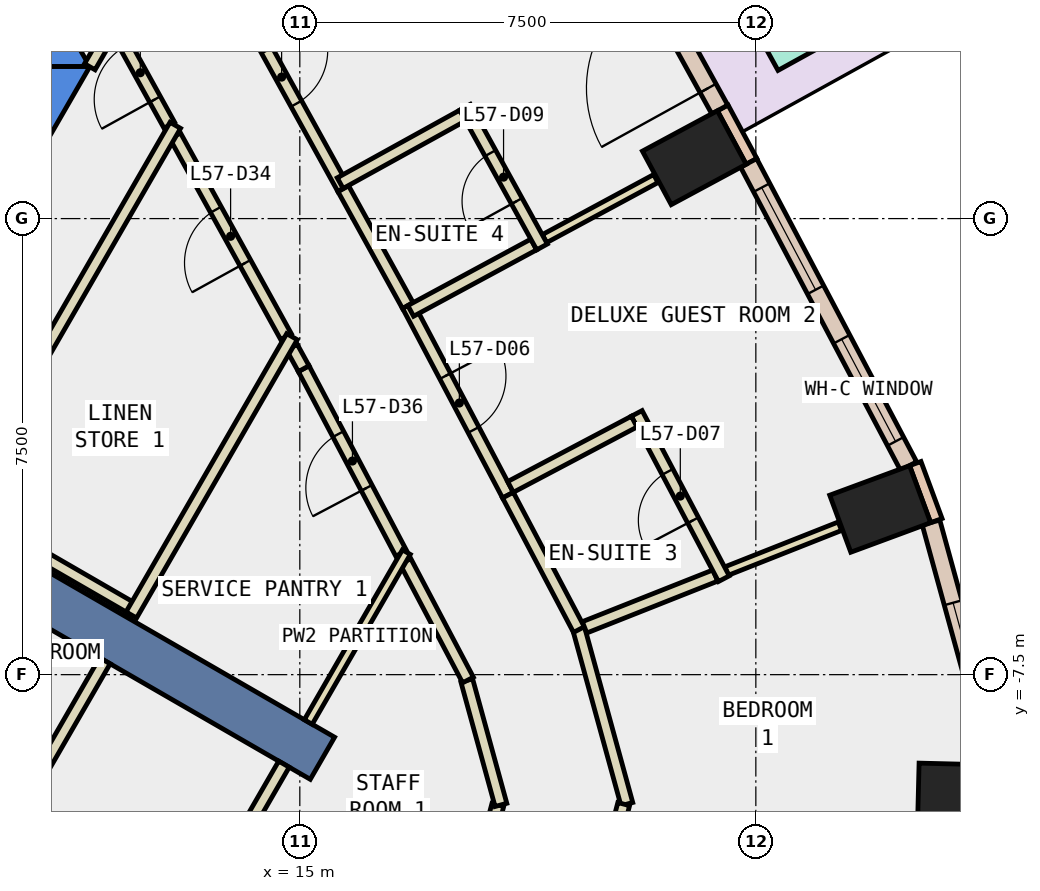
"""IFC4 building model, lengths in metres.
Left out: names, types, materials, properties, quantities, classifications, styles, units other than length and angle.
Written with IfcOpenShell. Run it as: python <this file> out.ifc"""

import sys

from ifc_helpers import new_model, si_unit, direction, frame, frame_2d, origin, origin_2d, place, context, subcontext, project, spatial, polyline, rectangle, outline, extrude, element, fill, save


model = new_model("IFC4")
c1 = context("Model", 3, precision=1e-05, world=origin(), true_north=direction((0.0, 1.0)))
c2 = subcontext(c1, "Body", "Model", "MODEL_VIEW")
j1 = project(units=[si_unit("LENGTHUNIT", "METRE"), si_unit("PLANEANGLEUNIT", "RADIAN")], contexts=[c1])
p1 = place(None, origin())
s1 = spatial("IfcSite", under=j1, at=p1, CompositionType="ELEMENT")
p2 = place(p1, origin())
s2 = spatial("IfcBuilding", under=s1, at=p2, CompositionType="ELEMENT")
p3 = place(p2, frame((0.0, 0.0, 252.2)))
s3 = spatial("IfcBuildingStorey", under=s2, at=p3, CompositionType="ELEMENT", Elevation=252.2)
for number, where, z_axis, x_axis in (
    (1, (25.872, -9.472, -0.34), (0.0, 0.0, 1.0), (0.025, 1.0, 0.0)),
    (2, (24.545, -4.775, -0.34), (0.0, 0.0, 1.0), (-0.347, 0.938, 0.0)),
    (3, (21.488, 1.001, -0.34), (0.0, 0.0, 1.0), (-0.474, 0.881, 0.0)),
):
    element("IfcColumn", number, at=place(p3, frame(where, z_axis=z_axis, x_axis=x_axis)), inside=s3, PredefinedType="COLUMN", context=c2, shape_type="SweptSolid", body=[
        extrude(rectangle(XDim=1.0, YDim=1.4, at=origin_2d()), origin(), (0.0, 0.0, 1.0), 3.6),
    ])
p4 = place(p3, frame((0.0, 0.0, -0.34)))
e4 = element("IfcWall", 4, at=p4, inside=s3, PredefinedType="SHEAR", context=c2, shape_type="SweptSolid", body=[
    extrude(outline(polyline([(6.786, 10.747), (6.266, 10.447), (10.854, 2.5), (11.547, 2.5), (6.786, 10.747)])), origin(), (0.0, 0.0, 1.0), 3.6),
])
p5 = place(p3, frame((0.0, 0.0, -0.34)))
e5 = element("IfcWall", 5, at=p5, inside=s3, PredefinedType="SHEAR", context=c2, shape_type="SweptSolid", body=[
    extrude(outline(polyline([(5.774, -7.5), (11.547, 2.5), (10.854, 2.5), (5.427, -6.9), (5.774, -7.5)])), origin(), (0.0, 0.0, 1.0), 3.6),
])
p6 = place(p3, frame((7.578, -4.375, -0.34), z_axis=(0.0, 0.0, 1.0), x_axis=(0.866024315419, -0.5000018851, 0.0)))
e6 = element("IfcWall", 6, at=p6, inside=s3, PredefinedType="SHEAR", context=c2, shape_type="SweptSolid", body=[
    extrude(rectangle(XDim=9.0, YDim=0.8, at=frame_2d((4.5, 0.0))), origin(), (0.0, 0.0, 1.0), 3.6),
])
p7 = place(p3, frame((25.469, -4.967, 0.0), z_axis=(0.0, 0.0, 1.0), x_axis=(-0.346892928577, 0.937904737222, 0.0)))
e7 = element("IfcWall", 7, at=p7, inside=s3, PredefinedType="STANDARD", context=c2, shape_type="SweptSolid", body=[
    extrude(rectangle(XDim=1.0, YDim=0.2, at=frame_2d((0.5, 0.0))), origin(), (0.0, 0.0, 1.0), 3.26),
])
p8 = place(p3, frame((22.429, 0.94, 0.0), z_axis=(0.0, 0.0, 1.0), x_axis=(-0.473663196434, 0.88070606694, 0.0)))
e8 = element("IfcWall", 8, at=p8, inside=s3, PredefinedType="STANDARD", context=c2, shape_type="SweptSolid", body=[
    extrude(rectangle(XDim=1.0, YDim=0.2, at=frame_2d((0.5, 0.0))), origin(), (0.0, 0.0, 1.0), 3.26),
])
p9 = place(p3, frame((26.477, -8.987, 0.0), z_axis=(0.0, 0.0, 1.0), x_axis=(-0.264924661919, 0.964269113633, 0.0)))
e9 = element("IfcWall", 9, at=p9, inside=s3, PredefinedType="STANDARD", context=c2, shape_type="SweptSolid", body=[
    extrude(rectangle(XDim=4.137, YDim=0.3, at=frame_2d((2.068, 0.0))), origin(), (0.0, 0.0, 1.0), 3.26),
])
p10 = place(p9, frame((1.368, 0.0, 0.9)))
e10 = element("IfcOpeningElement", 10, at=p10, cuts=e9, PredefinedType="OPENING", context=c2, shape_type="SweptSolid", body=[
    extrude(rectangle(XDim=1.4, YDim=2.0, at=frame_2d((0.7, 1.0))), frame((0.0, 0.16, 0.0), z_axis=(0.0, -1.0, 0.0), x_axis=(1.0, 0.0, 0.0)), (0.0, 0.0, 1.0), 0.32),
])
p11 = place(p3, frame((25.012, -4.07, 0.0), z_axis=(0.0, 0.0, 1.0), x_axis=(-0.466663589714, 0.884434900959, 0.0)))
e11 = element("IfcWall", 11, at=p11, inside=s3, PredefinedType="STANDARD", context=c2, shape_type="SweptSolid", body=[
    extrude(rectangle(XDim=5.638, YDim=0.3, at=frame_2d((2.819, 0.0))), origin(), (0.0, 0.0, 1.0), 3.26),
])
p12 = place(p11, frame((0.459, 0.0, 0.9)))
e12 = element("IfcOpeningElement", 12, at=p12, cuts=e11, PredefinedType="OPENING", context=c2, shape_type="SweptSolid", body=[
    extrude(rectangle(XDim=1.9, YDim=2.0, at=frame_2d((0.95, 1.0))), frame((0.0, 0.16, 0.0), z_axis=(0.0, -1.0, 0.0), x_axis=(1.0, 0.0, 0.0)), (0.0, 0.0, 1.0), 0.32),
])
p13 = place(p11, frame((3.278, 0.0, 0.9)))
e13 = element("IfcOpeningElement", 13, at=p13, cuts=e11, PredefinedType="OPENING", context=c2, shape_type="SweptSolid", body=[
    extrude(rectangle(XDim=1.9, YDim=2.0, at=frame_2d((0.95, 1.0))), frame((0.0, 0.16, 0.0), z_axis=(0.0, -1.0, 0.0), x_axis=(1.0, 0.0, 0.0)), (0.0, 0.0, 1.0), 0.32),
])
p14 = place(p3, frame((21.907, 1.794, 0.0), z_axis=(0.0, 0.0, 1.0), x_axis=(-0.483469062695, 0.875361448441, 0.0)))
e14 = element("IfcWall", 14, at=p14, inside=s3, PredefinedType="STANDARD", context=c2, shape_type="SweptSolid", body=[
    extrude(rectangle(XDim=5.601, YDim=0.3, at=frame_2d((2.801, 0.0))), origin(), (0.0, 0.0, 1.0), 3.26),
])
p15 = place(p14, frame((0.4, 0.0, 0.0)))
e15 = element("IfcOpeningElement", 15, at=p15, cuts=e14, PredefinedType="OPENING", context=c2, shape_type="SweptSolid", body=[
    extrude(rectangle(XDim=2.0, YDim=2.4, at=frame_2d((1.0, 1.2))), frame((0.0, 0.16, 0.0), z_axis=(0.0, -1.0, 0.0), x_axis=(1.0, 0.0, 0.0)), (0.0, 0.0, 1.0), 0.32),
])
p16 = place(p14, frame((3.251, 0.0, 0.9)))
e16 = element("IfcOpeningElement", 16, at=p16, cuts=e14, PredefinedType="OPENING", context=c2, shape_type="SweptSolid", body=[
    extrude(rectangle(XDim=1.9, YDim=2.0, at=frame_2d((0.95, 1.0))), frame((0.0, 0.16, 0.0), z_axis=(0.0, -1.0, 0.0), x_axis=(1.0, 0.0, 0.0)), (0.0, 0.0, 1.0), 0.32),
])
p17 = place(p3, frame((23.215, 2.63, 0.0), z_axis=(0.0, 0.0, 1.0), x_axis=(-0.483262482812, 0.87547551234, 0.0)))
e17 = element("IfcWall", 17, at=p17, inside=s3, PredefinedType="STANDARD", context=c2, shape_type="SweptSolid", body=[
    extrude(rectangle(XDim=5.403, YDim=0.8, at=frame_2d((2.702, 0.0))), origin(), (0.0, 0.0, 1.0), 0.8),
])
p18 = place(p3, frame((12.854, 1.535, 0.0), z_axis=(0.0, 0.0, 1.0), x_axis=(-0.483730980407, 0.875216738068, 0.0)))
e18 = element("IfcWall", 18, at=p18, inside=s3, PredefinedType="PARTITIONING", context=c2, shape_type="SweptSolid", body=[
    extrude(rectangle(XDim=1.974, YDim=0.2, at=frame_2d((0.987, 0.0))), origin(), (0.0, 0.0, 1.0), 3.26),
])
p19 = place(p18, frame((0.487, 0.0, 0.0)))
e19 = element("IfcOpeningElement", 19, at=p19, cuts=e18, PredefinedType="OPENING", context=c2, shape_type="SweptSolid", body=[
    extrude(rectangle(XDim=1.0, YDim=2.1, at=frame_2d((0.5, 1.05))), frame((0.0, 0.11, 0.0), z_axis=(0.0, -1.0, 0.0), x_axis=(1.0, 0.0, 0.0)), (0.0, 0.0, 1.0), 0.22),
])
p20 = place(p3, frame((11.893, 3.097, 0.0), z_axis=(0.0, 0.0, 1.0), x_axis=(-0.500911294014, -0.865498628265, 0.0)))
e20 = element("IfcWall", 20, at=p20, inside=s3, PredefinedType="PARTITIONING", context=c2, shape_type="SweptSolid", body=[
    extrude(rectangle(XDim=0.693, YDim=0.2, at=frame_2d((0.347, 0.0))), origin(), (0.0, 0.0, 1.0), 3.26),
])
p21 = place(p3, frame((14.773, -1.941, 0.0), z_axis=(0.0, 0.0, 1.0), x_axis=(-0.483431586589, 0.875382145744, 0.0)))
e21 = element("IfcWall", 21, at=p21, inside=s3, PredefinedType="PARTITIONING", context=c2, shape_type="SweptSolid", body=[
    extrude(rectangle(XDim=3.771, YDim=0.2, at=frame_2d((1.885, 0.0))), origin(), (0.0, 0.0, 1.0), 3.26),
])
p22 = place(p21, frame((1.385, 0.0, 0.0)))
e22 = element("IfcOpeningElement", 22, at=p22, cuts=e21, PredefinedType="OPENING", context=c2, shape_type="SweptSolid", body=[
    extrude(rectangle(XDim=1.0, YDim=2.1, at=frame_2d((0.5, 1.05))), frame((0.0, 0.11, 0.0), z_axis=(0.0, -1.0, 0.0), x_axis=(1.0, 0.0, 0.0)), (0.0, 0.0, 1.0), 0.22),
])
p23 = place(p3, frame((16.667, -5.505, 0.0), z_axis=(0.0, 0.0, 1.0), x_axis=(-0.466812680399, 0.884356218624, 0.0)))
e23 = element("IfcWall", 23, at=p23, inside=s3, PredefinedType="PARTITIONING", context=c2, shape_type="SweptSolid", body=[
    extrude(rectangle(XDim=3.434, YDim=0.2, at=frame_2d((1.717, 0.0))), origin(), (0.0, 0.0, 1.0), 3.26),
])
p24 = place(p23, frame((1.217, 0.0, 0.0)))
e24 = element("IfcOpeningElement", 24, at=p24, cuts=e23, PredefinedType="OPENING", context=c2, shape_type="SweptSolid", body=[
    extrude(rectangle(XDim=1.0, YDim=2.1, at=frame_2d((0.5, 1.05))), frame((0.0, 0.11, 0.0), z_axis=(0.0, -1.0, 0.0), x_axis=(1.0, 0.0, 0.0)), (0.0, 0.0, 1.0), 0.22),
])
p25 = place(p3, frame((15.064, -2.468, 0.0), z_axis=(0.0, 0.0, 1.0), x_axis=(-0.482338449744, 0.875984942735, 0.0)))
e25 = element("IfcWall", 25, at=p25, inside=s3, PredefinedType="PARTITIONING", context=c2, shape_type="SweptSolid", body=[
    extrude(rectangle(XDim=0.402, YDim=0.2, at=frame_2d((0.201, 0.0))), origin(), (0.0, 0.0, 1.0), 3.26),
])
p26 = place(p3, frame((18.077, -10.326, 0.0), z_axis=(0.0, 0.0, 1.0), x_axis=(0.254782174857, 0.966998471237, 0.0)))
e26 = element("IfcWall", 26, at=p26, inside=s3, PredefinedType="PARTITIONING", context=c2, shape_type="SweptSolid", body=[
    extrude(rectangle(XDim=0.707, YDim=0.2, at=frame_2d((0.354, 0.0))), origin(), (0.0, 0.0, 1.0), 3.26),
])
p27 = place(p3, frame((18.308, -9.642, 0.0), z_axis=(0.0, 0.0, 1.0), x_axis=(-0.264859637197, 0.96428697626, 0.0)))
e27 = element("IfcWall", 27, at=p27, inside=s3, PredefinedType="PARTITIONING", context=c2, shape_type="SweptSolid", body=[
    extrude(rectangle(XDim=2.122, YDim=0.2, at=frame_2d((1.061, 0.0))), origin(), (0.0, 0.0, 1.0), 3.26),
])
p28 = place(p3, frame((17.766, -7.588, 0.0), z_axis=(0.0, 0.0, 1.0), x_axis=(-0.466727344864, 0.884401258228, 0.0)))
e28 = element("IfcWall", 28, at=p28, inside=s3, PredefinedType="PARTITIONING", context=c2, shape_type="SweptSolid", body=[
    extrude(rectangle(XDim=2.205, YDim=0.2, at=frame_2d((1.103, 0.0))), origin(), (0.0, 0.0, 1.0), 3.26),
])
p29 = place(p3, frame((19.564, -6.662, 0.0), z_axis=(0.0, 0.0, 1.0), x_axis=(0.264876135597, -0.96428244451, 0.0)))
e29 = element("IfcWall", 29, at=p29, inside=s3, PredefinedType="PARTITIONING", context=c2, shape_type="SweptSolid", body=[
    extrude(rectangle(XDim=3.077, YDim=0.2, at=frame_2d((1.538, 0.0))), origin(), (0.0, 0.0, 1.0), 3.26),
])
p30 = place(p3, frame((20.327, -9.629, 0.0), z_axis=(0.0, 0.0, 1.0), x_axis=(-0.253192482031, -0.967415922467, 0.0)))
e30 = element("IfcWall", 30, at=p30, inside=s3, PredefinedType="PARTITIONING", context=c2, shape_type="SweptSolid", body=[
    extrude(rectangle(XDim=1.792, YDim=0.2, at=frame_2d((0.896, 0.0))), origin(), (0.0, 0.0, 1.0), 3.26),
])
p31 = place(p3, frame((16.778, -1.429, 0.0), z_axis=(0.0, 0.0, 1.0), x_axis=(0.466493865945, -0.884524433261, 0.0)))
e31 = element("IfcWall", 31, at=p31, inside=s3, PredefinedType="PARTITIONING", context=c2, shape_type="SweptSolid", body=[
    extrude(rectangle(XDim=3.526, YDim=0.2, at=frame_2d((1.763, 0.0))), origin(), (0.0, 0.0, 1.0), 3.26),
])
p32 = place(p31, frame((1.313, 0.0, 0.0)))
e32 = element("IfcOpeningElement", 32, at=p32, cuts=e31, PredefinedType="OPENING", context=c2, shape_type="SweptSolid", body=[
    extrude(rectangle(XDim=1.0, YDim=2.1, at=frame_2d((0.5, 1.05))), frame((0.0, 0.11, 0.0), z_axis=(0.0, -1.0, 0.0), x_axis=(1.0, 0.0, 0.0)), (0.0, 0.0, 1.0), 0.22),
])
p33 = place(p3, frame((18.423, -4.548, 0.0), z_axis=(0.0, 0.0, 1.0), x_axis=(0.466792565793, -0.884366835946, 0.0)))
e33 = element("IfcWall", 33, at=p33, inside=s3, PredefinedType="PARTITIONING", context=c2, shape_type="SweptSolid", body=[
    extrude(rectangle(XDim=2.5, YDim=0.2, at=frame_2d((1.25, 0.0))), origin(), (0.0, 0.0, 1.0), 3.26),
])
p34 = place(p3, frame((13.641, 4.246, 0.0), z_axis=(0.0, 0.0, 1.0), x_axis=(0.483405752983, -0.875396411909, 0.0)))
e34 = element("IfcWall", 34, at=p34, inside=s3, PredefinedType="PARTITIONING", context=c2, shape_type="SweptSolid", body=[
    extrude(rectangle(XDim=4.284, YDim=0.2, at=frame_2d((2.142, 0.0))), origin(), (0.0, 0.0, 1.0), 3.26),
])
p35 = place(p34, frame((1.692, 0.0, 0.0)))
e35 = element("IfcOpeningElement", 35, at=p35, cuts=e34, PredefinedType="OPENING", context=c2, shape_type="SweptSolid", body=[
    extrude(rectangle(XDim=1.0, YDim=2.1, at=frame_2d((0.5, 1.05))), frame((0.0, 0.11, 0.0), z_axis=(0.0, -1.0, 0.0), x_axis=(1.0, 0.0, 0.0)), (0.0, 0.0, 1.0), 0.22),
])
p36 = place(p3, frame((15.715, 0.491, 0.0), z_axis=(0.0, 0.0, 1.0), x_axis=(0.483421428323, -0.875387755591, 0.0)))
e36 = element("IfcWall", 36, at=p36, inside=s3, PredefinedType="PARTITIONING", context=c2, shape_type="SweptSolid", body=[
    extrude(rectangle(XDim=2.194, YDim=0.2, at=frame_2d((1.097, 0.0))), origin(), (0.0, 0.0, 1.0), 3.26),
])
p37 = place(p3, frame((9.285, -4.818, 0.0), z_axis=(0.0, 0.0, 1.0), x_axis=(0.499962569651, 0.866047013128, 0.0)))
e37 = element("IfcWall", 37, at=p37, inside=s3, PredefinedType="PARTITIONING", context=c2, shape_type="SweptSolid", body=[
    extrude(rectangle(XDim=7.334, YDim=0.2, at=frame_2d((3.667, 0.0))), origin(), (0.0, 0.0, 1.0), 3.26),
])
p38 = place(p3, frame((9.335, -4.732, 0.0), z_axis=(0.0, 0.0, 1.0), x_axis=(0.866002606077, -0.500039484709, 0.0)))
e38 = element("IfcWall", 38, at=p38, inside=s3, PredefinedType="PARTITIONING", context=c2, shape_type="SweptSolid", body=[
    extrude(rectangle(XDim=3.4, YDim=0.2, at=frame_2d((1.7, 0.0))), origin(), (0.0, 0.0, 1.0), 3.26),
])
p39 = place(p3, frame((11.794, -7.271, 0.0), z_axis=(0.0, 0.0, 1.0), x_axis=(-0.499918457185, -0.866072477433, 0.0)))
e39 = element("IfcWall", 39, at=p39, inside=s3, PredefinedType="PARTITIONING", context=c2, shape_type="SweptSolid", body=[
    extrude(rectangle(XDim=5.607, YDim=0.2, at=frame_2d((2.803, 0.0))), origin(), (0.0, 0.0, 1.0), 3.26),
])
p40 = place(p3, frame((14.871, -1.942, 0.0), z_axis=(0.0, 0.0, 1.0), x_axis=(-0.50000507839, -0.866022471755, 0.0)))
e40 = element("IfcWall", 40, at=p40, inside=s3, PredefinedType="PARTITIONING", context=c2, shape_type="SweptSolid", body=[
    extrude(rectangle(XDim=5.284, YDim=0.2, at=frame_2d((2.642, 0.0))), origin(), (0.0, 0.0, 1.0), 3.26),
])
p41 = place(p3, frame((14.739, -8.972, 0.0), z_axis=(0.0, 0.0, 1.0), x_axis=(-0.499974489635, -0.8660401317, 0.0)))
e41 = element("IfcWall", 41, at=p41, inside=s3, PredefinedType="PARTITIONING", context=c2, shape_type="SweptSolid", body=[
    extrude(rectangle(XDim=3.382, YDim=0.2, at=frame_2d((1.691, 0.0))), origin(), (0.0, 0.0, 1.0), 3.26),
])
p42 = place(p3, frame((16.752, -5.485, 0.0), z_axis=(0.0, 0.0, 1.0), x_axis=(-0.499988848364, -0.866031842089, 0.0)))
e42 = element("IfcWall", 42, at=p42, inside=s3, PredefinedType="PARTITIONING", context=c2, shape_type="SweptSolid", body=[
    extrude(rectangle(XDim=3.226, YDim=0.15, at=frame_2d((1.613, 0.0))), origin(), (0.0, 0.0, 1.0), 3.26),
])
p43 = place(p3, frame((22.02, -5.796, 0.0), z_axis=(0.0, 0.0, 1.0), x_axis=(0.929915172208, 0.367774078066, 0.0)))
e43 = element("IfcWall", 43, at=p43, inside=s3, PredefinedType="PARTITIONING", context=c2, shape_type="SweptSolid", body=[
    extrude(rectangle(XDim=2.003, YDim=0.15, at=frame_2d((1.002, 0.0))), origin(), (0.0, 0.0, 1.0), 3.26),
])
p44 = place(p3, frame((19.683, -6.722, 0.0), z_axis=(0.0, 0.0, 1.0), x_axis=(0.929744903847, 0.368204309821, 0.0)))
e44 = element("IfcWall", 44, at=p44, inside=s3, PredefinedType="PARTITIONING", context=c2, shape_type="SweptSolid", body=[
    extrude(rectangle(XDim=2.313, YDim=0.2, at=frame_2d((1.157, 0.0))), origin(), (0.0, 0.0, 1.0), 3.26),
])
p45 = place(p3, frame((21.974, -5.922, 0.0), z_axis=(0.0, 0.0, 1.0), x_axis=(-0.466401249432, 0.88457327256, 0.0)))
e45 = element("IfcWall", 45, at=p45, inside=s3, PredefinedType="PARTITIONING", context=c2, shape_type="SweptSolid", body=[
    extrude(rectangle(XDim=3.073, YDim=0.2, at=frame_2d((1.536, 0.0))), origin(), (0.0, 0.0, 1.0), 3.26),
])
p46 = place(p45, frame((1.086, 0.0, 0.0)))
e46 = element("IfcOpeningElement", 46, at=p46, cuts=e45, PredefinedType="OPENING", context=c2, shape_type="SweptSolid", body=[
    extrude(rectangle(XDim=0.9, YDim=2.1, at=frame_2d((0.45, 1.05))), frame((0.0, 0.11, 0.0), z_axis=(0.0, -1.0, 0.0), x_axis=(1.0, 0.0, 0.0)), (0.0, 0.0, 1.0), 0.22),
])
p47 = place(p3, frame((20.499, -3.339, 0.0), z_axis=(0.0, 0.0, 1.0), x_axis=(-0.884293452572, -0.466931568583, 0.0)))
e47 = element("IfcWall", 47, at=p47, inside=s3, PredefinedType="PARTITIONING", context=c2, shape_type="SweptSolid", body=[
    extrude(rectangle(XDim=2.3, YDim=0.2, at=frame_2d((1.15, 0.0))), origin(), (0.0, 0.0, 1.0), 3.26),
])
p48 = place(p3, frame((19.023, -0.33, 0.0), z_axis=(0.0, 0.0, 1.0), x_axis=(0.880158309515, 0.474680261009, 0.0)))
e48 = element("IfcWall", 48, at=p48, inside=s3, PredefinedType="PARTITIONING", context=c2, shape_type="SweptSolid", body=[
    extrude(rectangle(XDim=2.082, YDim=0.15, at=frame_2d((1.041, 0.0))), origin(), (0.0, 0.0, 1.0), 3.26),
])
p49 = place(p3, frame((16.824, -1.518, 0.0), z_axis=(0.0, 0.0, 1.0), x_axis=(0.87996932648, 0.475030508972, 0.0)))
e49 = element("IfcWall", 49, at=p49, inside=s3, PredefinedType="PARTITIONING", context=c2, shape_type="SweptSolid", body=[
    extrude(rectangle(XDim=2.299, YDim=0.2, at=frame_2d((1.149, 0.0))), origin(), (0.0, 0.0, 1.0), 3.26),
])
p50 = place(p3, frame((18.984, -0.466, 0.0), z_axis=(0.0, 0.0, 1.0), x_axis=(-0.482922337539, 0.875663186337, 0.0)))
e50 = element("IfcWall", 50, at=p50, inside=s3, PredefinedType="PARTITIONING", context=c2, shape_type="SweptSolid", body=[
    extrude(rectangle(XDim=2.623, YDim=0.2, at=frame_2d((1.312, 0.0))), origin(), (0.0, 0.0, 1.0), 3.26),
])
p51 = place(p50, frame((0.861, 0.0, 0.0)))
e51 = element("IfcOpeningElement", 51, at=p51, cuts=e50, PredefinedType="OPENING", context=c2, shape_type="SweptSolid", body=[
    extrude(rectangle(XDim=0.9, YDim=2.1, at=frame_2d((0.45, 1.05))), frame((0.0, 0.11, 0.0), z_axis=(0.0, -1.0, 0.0), x_axis=(1.0, 0.0, 0.0)), (0.0, 0.0, 1.0), 0.22),
])
p52 = place(p3, frame((17.677, 1.695, 0.0), z_axis=(0.0, 0.0, 1.0), x_axis=(-0.875306576455, -0.483568399727, 0.0)))
e52 = element("IfcWall", 52, at=p52, inside=s3, PredefinedType="PARTITIONING", context=c2, shape_type="SweptSolid", body=[
    extrude(rectangle(XDim=2.3, YDim=0.2, at=frame_2d((1.15, 0.0))), origin(), (0.0, 0.0, 1.0), 3.26),
])
p53 = place(p10, origin())
e53 = element("IfcWindow", 53, at=p53, inside=s3, PartitioningType="SINGLE_PANEL", PredefinedType="WINDOW", context=c2, shape_type="SweptSolid", body=[
    extrude(rectangle(XDim=1.4, YDim=2.0, at=frame_2d((0.7, 1.0))), frame((0.0, 0.03, 0.0), z_axis=(0.0, -1.0, 0.0), x_axis=(1.0, 0.0, 0.0)), (0.0, 0.0, 1.0), 0.06),
])
fill(e10, e53)
p54 = place(p12, origin())
e54 = element("IfcWindow", 54, at=p54, inside=s3, PartitioningType="SINGLE_PANEL", PredefinedType="WINDOW", context=c2, shape_type="SweptSolid", body=[
    extrude(rectangle(XDim=1.9, YDim=2.0, at=frame_2d((0.95, 1.0))), frame((0.0, 0.03, 0.0), z_axis=(0.0, -1.0, 0.0), x_axis=(1.0, 0.0, 0.0)), (0.0, 0.0, 1.0), 0.06),
])
fill(e12, e54)
p55 = place(p13, origin())
e55 = element("IfcWindow", 55, at=p55, inside=s3, PartitioningType="SINGLE_PANEL", PredefinedType="WINDOW", context=c2, shape_type="SweptSolid", body=[
    extrude(rectangle(XDim=1.9, YDim=2.0, at=frame_2d((0.95, 1.0))), frame((0.0, 0.03, 0.0), z_axis=(0.0, -1.0, 0.0), x_axis=(1.0, 0.0, 0.0)), (0.0, 0.0, 1.0), 0.06),
])
fill(e13, e55)
p56 = place(p15, origin())
e56 = element("IfcDoor", 56, at=p56, inside=s3, OperationType="SLIDING_TO_LEFT", PredefinedType="DOOR", context=c2, shape_type="SweptSolid", body=[
    extrude(rectangle(XDim=2.0, YDim=2.4, at=frame_2d((1.0, 1.2))), frame((0.0, 0.025, 0.0), z_axis=(0.0, -1.0, 0.0), x_axis=(1.0, 0.0, 0.0)), (0.0, 0.0, 1.0), 0.05),
])
fill(e15, e56)
p57 = place(p32, origin())
e57 = element("IfcDoor", 57, at=p57, inside=s3, OperationType="SINGLE_SWING_RIGHT", PredefinedType="DOOR", context=c2, shape_type="SweptSolid", body=[
    extrude(rectangle(XDim=1.0, YDim=2.1, at=frame_2d((0.5, 1.05))), frame((0.0, 0.025, 0.0), z_axis=(0.0, -1.0, 0.0), x_axis=(1.0, 0.0, 0.0)), (0.0, 0.0, 1.0), 0.05),
])
fill(e32, e57)
p58 = place(p46, origin())
e58 = element("IfcDoor", 58, at=p58, inside=s3, OperationType="SINGLE_SWING_RIGHT", PredefinedType="DOOR", context=c2, shape_type="SweptSolid", body=[
    extrude(rectangle(XDim=0.9, YDim=2.1, at=frame_2d((0.45, 1.05))), frame((0.0, 0.025, 0.0), z_axis=(0.0, -1.0, 0.0), x_axis=(1.0, 0.0, 0.0)), (0.0, 0.0, 1.0), 0.05),
])
fill(e46, e58)
p59 = place(p35, origin())
e59 = element("IfcDoor", 59, at=p59, inside=s3, OperationType="SINGLE_SWING_RIGHT", PredefinedType="DOOR", context=c2, shape_type="SweptSolid", body=[
    extrude(rectangle(XDim=1.0, YDim=2.1, at=frame_2d((0.5, 1.05))), frame((0.0, 0.025, 0.0), z_axis=(0.0, -1.0, 0.0), x_axis=(1.0, 0.0, 0.0)), (0.0, 0.0, 1.0), 0.05),
])
fill(e35, e59)
p60 = place(p51, origin())
e60 = element("IfcDoor", 60, at=p60, inside=s3, OperationType="SINGLE_SWING_LEFT", PredefinedType="DOOR", context=c2, shape_type="SweptSolid", body=[
    extrude(rectangle(XDim=0.9, YDim=2.1, at=frame_2d((0.45, 1.05))), frame((0.0, 0.025, 0.0), z_axis=(0.0, -1.0, 0.0), x_axis=(1.0, 0.0, 0.0)), (0.0, 0.0, 1.0), 0.05),
])
fill(e51, e60)
p61 = place(p22, origin())
e61 = element("IfcDoor", 61, at=p61, inside=s3, OperationType="SINGLE_SWING_LEFT", PredefinedType="DOOR", context=c2, shape_type="SweptSolid", body=[
    extrude(rectangle(XDim=1.0, YDim=2.1, at=frame_2d((0.5, 1.05))), frame((0.0, 0.025, 0.0), z_axis=(0.0, -1.0, 0.0), x_axis=(1.0, 0.0, 0.0)), (0.0, 0.0, 1.0), 0.05),
])
fill(e22, e61)
p62 = place(p24, origin())
e62 = element("IfcDoor", 62, at=p62, inside=s3, OperationType="SINGLE_SWING_RIGHT", PredefinedType="DOOR", context=c2, shape_type="SweptSolid", body=[
    extrude(rectangle(XDim=1.0, YDim=2.1, at=frame_2d((0.5, 1.05))), frame((0.0, 0.025, 0.0), z_axis=(0.0, -1.0, 0.0), x_axis=(1.0, 0.0, 0.0)), (0.0, 0.0, 1.0), 0.05),
])
fill(e24, e62)
p63 = place(p19, origin())
e63 = element("IfcDoor", 63, at=p63, inside=s3, OperationType="SINGLE_SWING_LEFT", PredefinedType="DOOR", context=c2, shape_type="SweptSolid", body=[
    extrude(rectangle(XDim=1.0, YDim=2.1, at=frame_2d((0.5, 1.05))), frame((0.0, 0.025, 0.0), z_axis=(0.0, -1.0, 0.0), x_axis=(1.0, 0.0, 0.0)), (0.0, 0.0, 1.0), 0.05),
])
fill(e19, e63)
save(model, sys.argv[1])
